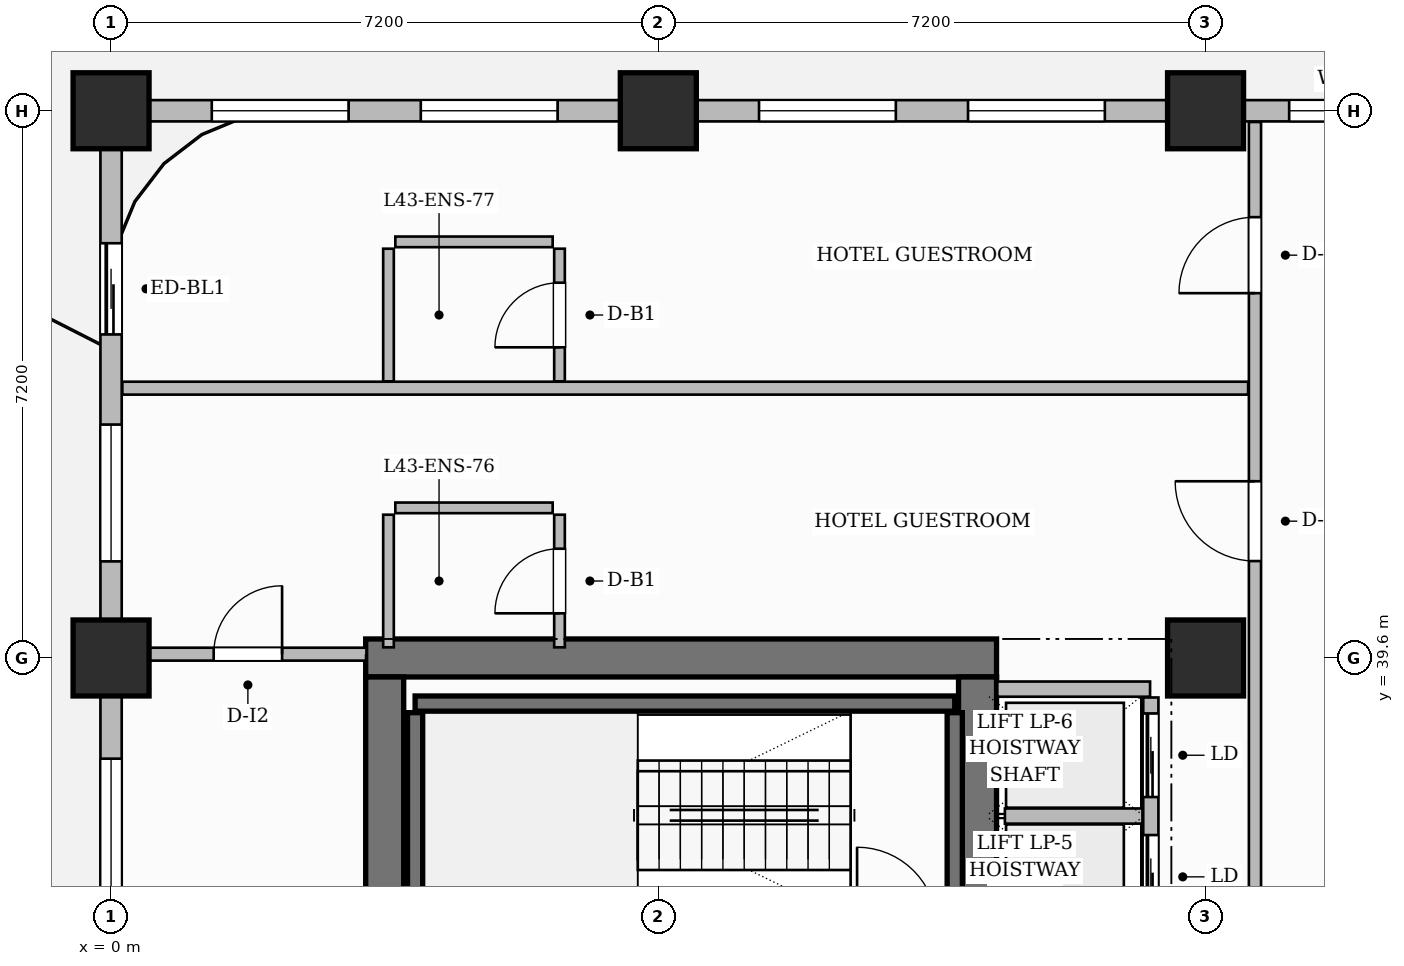
"""IFC4 building model, lengths in metres.
Left out: names, types, materials, properties, quantities, classifications, styles, units other than length and angle.
Written with IfcOpenShell. Run it as: python <this file> out.ifc"""

import sys

from ifc_helpers import new_model, si_unit, direction, frame, frame_2d, origin, origin_2d, place, context, subcontext, project, spatial, rectangle, extrude, source, transform, mapped, element, fill, save


model = new_model("IFC4")
c1 = context("Model", 3, precision=1e-05, world=origin(), true_north=direction((0.0, 1.0)))
c2 = subcontext(c1, "Body", "Model", "MODEL_VIEW")
j1 = project(units=[si_unit("LENGTHUNIT", "METRE"), si_unit("PLANEANGLEUNIT", "RADIAN")], contexts=[c1])
p1 = place(None, origin())
s1 = spatial("IfcSite", under=j1, at=p1, CompositionType="ELEMENT")
p2 = place(p1, origin())
s2 = spatial("IfcBuilding", under=s1, at=p2, CompositionType="ELEMENT")
p3 = place(p2, frame((0.0, 0.0, 173.4)))
s3 = spatial("IfcBuildingStorey", under=s2, at=p3, CompositionType="ELEMENT", Elevation=173.4)
p4 = place(p3, frame((3.35, 39.6, 0.0), z_axis=(0.0, 0.0, 1.0), x_axis=(1.0, 0.0, 0.0)))
e1 = element("IfcWall", 1, at=p4, inside=s3, PredefinedType="SHEAR", context=c2, shape_type="SweptSolid", body=[
    extrude(rectangle(XDim=8.3, YDim=0.5, at=frame_2d((4.15, 0.0))), origin(), (0.0, 0.0, 1.0), 3.85),
])
p5 = place(p3, frame((3.6, 25.45, 0.0), z_axis=(0.0, 0.0, 1.0), x_axis=(0.0, 1.0, 0.0)))
e2 = element("IfcWall", 2, at=p5, inside=s3, PredefinedType="SHEAR", context=c2, shape_type="SweptSolid", body=[
    extrude(rectangle(XDim=13.9, YDim=0.5, at=frame_2d((6.95, 0.0))), origin(), (0.0, 0.0, 1.0), 3.85),
])
p6 = place(p3, frame((11.4, 25.45, 0.0), z_axis=(0.0, 0.0, 1.0), x_axis=(0.0, 1.0, 0.0)))
e3 = element("IfcWall", 3, at=p6, inside=s3, PredefinedType="SHEAR", context=c2, shape_type="SweptSolid", body=[
    extrude(rectangle(XDim=13.9, YDim=0.5, at=frame_2d((6.95, 0.0))), origin(), (0.0, 0.0, 1.0), 3.85),
])
p7 = place(p6, frame((6.52, 0.0, 0.0)))
e4 = element("IfcOpeningElement", 4, at=p7, cuts=e3, PredefinedType="OPENING", context=c2, shape_type="SweptSolid", body=[
    extrude(rectangle(XDim=1.5, YDim=2.2, at=frame_2d((0.75, 1.1))), frame((0.0, 0.26, 0.0), z_axis=(0.0, -1.0, 0.0), x_axis=(1.0, 0.0, 0.0)), (0.0, 0.0, 1.0), 0.52),
])
m1 = source(origin(), c2, "Body", "SweptSolid", [
    extrude(rectangle(XDim=1.0, YDim=1.0, at=origin_2d()), origin(), (0.0, 0.0, 1.0), 3.85),
])
for number, where, z_axis, x_axis in (
    (5, (0.0, 39.6, 0.0), (0.0, 0.0, 1.0), (1.0, 0.0, 0.0)),
    (6, (0.0, 46.8, 0.0), (0.0, 0.0, 1.0), (1.0, 0.0, 0.0)),
    (7, (7.2, 46.8, 0.0), (0.0, 0.0, 1.0), (1.0, 0.0, 0.0)),
    (8, (14.4, 39.6, 0.0), (0.0, 0.0, 1.0), (1.0, 0.0, 0.0)),
    (9, (14.4, 46.8, 0.0), (0.0, 0.0, 1.0), (1.0, 0.0, 0.0)),
):
    element("IfcColumn", number, at=place(p3, frame(where, z_axis=z_axis, x_axis=x_axis)), inside=s3, PredefinedType="COLUMN", context=c2, shape_type="MappedRepresentation", body=[
        mapped(m1, transform((0.0, 0.0, 0.0), scale=1.0)),
    ])
p8 = place(p3, frame((4.0, 39.0, 0.0), z_axis=(0.0, 0.0, 1.0), x_axis=(1.0, 0.0, 0.0)))
e10 = element("IfcWall", 10, at=p8, inside=s3, PredefinedType="SHEAR", context=c2, shape_type="SweptSolid", body=[
    extrude(rectangle(XDim=7.1, YDim=0.2, at=frame_2d((3.55, 0.0))), origin(), (0.0, 0.0, 1.0), 3.85),
])
for number, where, z_axis, x_axis in (
    (11, (4.0, 36.18, 0.0), (0.0, 0.0, 1.0), (0.0, 1.0, 0.0)),
    (12, (11.1, 36.18, 0.0), (0.0, 0.0, 1.0), (0.0, 1.0, 0.0)),
):
    element("IfcWall", number, at=place(p3, frame(where, z_axis=z_axis, x_axis=x_axis)), inside=s3, PredefinedType="SHEAR", context=c2, shape_type="SweptSolid", body=[
        extrude(rectangle(XDim=2.7, YDim=0.2, at=frame_2d((1.35, 0.0))), origin(), (0.0, 0.0, 1.0), 3.85),
    ])
p9 = place(p3, frame((11.66, 39.19, 0.0), z_axis=(0.0, 0.0, 1.0), x_axis=(1.0, 0.0, 0.0)))
e13 = element("IfcWall", 13, at=p9, inside=s3, PredefinedType="PARTITIONING", context=c2, shape_type="SweptSolid", body=[
    extrude(rectangle(XDim=2.01, YDim=0.2, at=frame_2d((1.005, 0.0))), origin(), (0.0, 0.0, 1.0), 3.6),
])
p10 = place(p3, frame((13.68, 34.36, 0.0), z_axis=(0.0, 0.0, 1.0), x_axis=(0.0, 1.0, 0.0)))
e14 = element("IfcWall", 14, at=p10, inside=s3, PredefinedType="PARTITIONING", context=c2, shape_type="SweptSolid", body=[
    extrude(rectangle(XDim=4.72, YDim=0.2, at=frame_2d((2.36, 0.0))), origin(), (0.0, 0.0, 1.0), 3.6),
])
p11 = place(p10, frame((0.21, 0.0, 0.0)))
e15 = element("IfcOpeningElement", 15, at=p11, cuts=e14, PredefinedType="OPENING", context=c2, shape_type="SweptSolid", body=[
    extrude(rectangle(XDim=1.1, YDim=2.2, at=frame_2d((0.55, 1.1))), frame((0.0, 0.11, 0.0), z_axis=(0.0, -1.0, 0.0), x_axis=(1.0, 0.0, 0.0)), (0.0, 0.0, 1.0), 0.22),
])
p12 = place(p10, frame((1.81, 0.0, 0.0)))
e16 = element("IfcOpeningElement", 16, at=p12, cuts=e14, PredefinedType="OPENING", context=c2, shape_type="SweptSolid", body=[
    extrude(rectangle(XDim=1.1, YDim=2.2, at=frame_2d((0.55, 1.1))), frame((0.0, 0.11, 0.0), z_axis=(0.0, -1.0, 0.0), x_axis=(1.0, 0.0, 0.0)), (0.0, 0.0, 1.0), 0.22),
])
p13 = place(p10, frame((3.41, 0.0, 0.0)))
e17 = element("IfcOpeningElement", 17, at=p13, cuts=e14, PredefinedType="OPENING", context=c2, shape_type="SweptSolid", body=[
    extrude(rectangle(XDim=1.1, YDim=2.2, at=frame_2d((0.55, 1.1))), frame((0.0, 0.11, 0.0), z_axis=(0.0, -1.0, 0.0), x_axis=(1.0, 0.0, 0.0)), (0.0, 0.0, 1.0), 0.22),
])
p14 = place(p3, frame((11.76, 37.52, 0.0), z_axis=(0.0, 0.0, 1.0), x_axis=(1.0, 0.0, 0.0)))
e18 = element("IfcWall", 18, at=p14, inside=s3, PredefinedType="PARTITIONING", context=c2, shape_type="SweptSolid", body=[
    extrude(rectangle(XDim=1.81, YDim=0.2, at=frame_2d((0.905, 0.0))), origin(), (0.0, 0.0, 1.0), 3.6),
])
p15 = place(p3, frame((0.24, 39.65, 0.0), z_axis=(0.0, 0.0, 1.0), x_axis=(1.0, 0.0, 0.0)))
e19 = element("IfcWall", 19, at=p15, inside=s3, PredefinedType="PARTITIONING", context=c2, shape_type="SweptSolid", body=[
    extrude(rectangle(XDim=3.12, YDim=0.17, at=frame_2d((1.56, 0.0))), origin(), (0.0, 0.0, 1.0), 3.6),
])
p16 = place(p15, frame((1.11, 0.0, 0.0)))
e20 = element("IfcOpeningElement", 20, at=p16, cuts=e19, PredefinedType="OPENING", context=c2, shape_type="SweptSolid", body=[
    extrude(rectangle(XDim=0.9, YDim=2.15, at=frame_2d((0.45, 1.075))), frame((0.0, 0.095, 0.0), z_axis=(0.0, -1.0, 0.0), x_axis=(1.0, 0.0, 0.0)), (0.0, 0.0, 1.0), 0.19),
])
p17 = place(p3, frame((15.05, 34.34, 0.0), z_axis=(0.0, 0.0, 1.0), x_axis=(0.0, 1.0, 0.0)))
e21 = element("IfcWall", 21, at=p17, inside=s3, PredefinedType="PARTITIONING", context=c2, shape_type="SweptSolid", body=[
    extrude(rectangle(XDim=12.312, YDim=0.16, at=frame_2d((6.156, 0.0))), origin(), (0.0, 0.0, 1.0), 3.6),
])
p18 = place(p17, frame((6.535, 0.0, 0.0)))
e22 = element("IfcOpeningElement", 22, at=p18, cuts=e21, PredefinedType="OPENING", context=c2, shape_type="SweptSolid", body=[
    extrude(rectangle(XDim=1.05, YDim=2.25, at=frame_2d((0.525, 1.125))), frame((0.0, 0.09, 0.0), z_axis=(0.0, -1.0, 0.0), x_axis=(1.0, 0.0, 0.0)), (0.0, 0.0, 1.0), 0.18),
])
p19 = place(p17, frame((10.06, 0.0, 0.0)))
e23 = element("IfcOpeningElement", 23, at=p19, cuts=e21, PredefinedType="OPENING", context=c2, shape_type="SweptSolid", body=[
    extrude(rectangle(XDim=1.0, YDim=2.2, at=frame_2d((0.5, 1.1))), frame((0.0, 0.09, 0.0), z_axis=(0.0, -1.0, 0.0), x_axis=(1.0, 0.0, 0.0)), (0.0, 0.0, 1.0), 0.18),
])
p20 = place(p3, frame((0.148, 43.15, 0.0), z_axis=(0.0, 0.0, 1.0), x_axis=(1.0, 0.0, 0.0)))
e24 = element("IfcWall", 24, at=p20, inside=s3, PredefinedType="PARTITIONING", context=c2, shape_type="SweptSolid", body=[
    extrude(rectangle(XDim=14.812, YDim=0.17, at=frame_2d((7.406, 0.0))), origin(), (0.0, 0.0, 1.0), 3.6),
])
p21 = place(p3, frame((3.65, 39.74, 0.0), z_axis=(0.0, 0.0, 1.0), x_axis=(0.0, 1.0, 0.0)))
e25 = element("IfcWall", 25, at=p21, inside=s3, PredefinedType="PARTITIONING", context=c2, shape_type="SweptSolid", body=[
    extrude(rectangle(XDim=1.745, YDim=0.14, at=frame_2d((0.873, 0.0))), origin(), (0.0, 0.0, 1.0), 3.6),
])
p22 = place(p3, frame((3.74, 41.575, 0.0), z_axis=(0.0, 0.0, 1.0), x_axis=(1.0, 0.0, 0.0)))
e26 = element("IfcWall", 26, at=p22, inside=s3, PredefinedType="PARTITIONING", context=c2, shape_type="SweptSolid", body=[
    extrude(rectangle(XDim=2.07, YDim=0.14, at=frame_2d((1.035, 0.0))), origin(), (0.0, 0.0, 1.0), 3.085),
])
p23 = place(p3, frame((5.9, 39.74, 0.0), z_axis=(0.0, 0.0, 1.0), x_axis=(0.0, 1.0, 0.0)))
e27 = element("IfcWall", 27, at=p23, inside=s3, PredefinedType="PARTITIONING", context=c2, shape_type="SweptSolid", body=[
    extrude(rectangle(XDim=1.745, YDim=0.14, at=frame_2d((0.873, 0.0))), origin(), (0.0, 0.0, 1.0), 3.6),
])
p24 = place(p23, frame((0.448, 0.0, 0.0)))
e28 = element("IfcOpeningElement", 28, at=p24, cuts=e27, PredefinedType="OPENING", context=c2, shape_type="SweptSolid", body=[
    extrude(rectangle(XDim=0.85, YDim=2.1, at=frame_2d((0.425, 1.05))), frame((0.0, 0.08, 0.0), z_axis=(0.0, -1.0, 0.0), x_axis=(1.0, 0.0, 0.0)), (0.0, 0.0, 1.0), 0.16),
])
p25 = place(p3, frame((3.65, 43.24, 0.0), z_axis=(0.0, 0.0, 1.0), x_axis=(0.0, 1.0, 0.0)))
e29 = element("IfcWall", 29, at=p25, inside=s3, PredefinedType="PARTITIONING", context=c2, shape_type="SweptSolid", body=[
    extrude(rectangle(XDim=1.745, YDim=0.14, at=frame_2d((0.873, 0.0))), origin(), (0.0, 0.0, 1.0), 3.6),
])
p26 = place(p3, frame((3.74, 45.075, 0.0), z_axis=(0.0, 0.0, 1.0), x_axis=(1.0, 0.0, 0.0)))
e30 = element("IfcWall", 30, at=p26, inside=s3, PredefinedType="PARTITIONING", context=c2, shape_type="SweptSolid", body=[
    extrude(rectangle(XDim=2.07, YDim=0.14, at=frame_2d((1.035, 0.0))), origin(), (0.0, 0.0, 1.0), 3.6),
])
p27 = place(p3, frame((5.9, 43.24, 0.0), z_axis=(0.0, 0.0, 1.0), x_axis=(0.0, 1.0, 0.0)))
e31 = element("IfcWall", 31, at=p27, inside=s3, PredefinedType="PARTITIONING", context=c2, shape_type="SweptSolid", body=[
    extrude(rectangle(XDim=1.745, YDim=0.14, at=frame_2d((0.873, 0.0))), origin(), (0.0, 0.0, 1.0), 3.6),
])
p28 = place(p27, frame((0.448, 0.0, 0.0)))
e32 = element("IfcOpeningElement", 32, at=p28, cuts=e31, PredefinedType="OPENING", context=c2, shape_type="SweptSolid", body=[
    extrude(rectangle(XDim=0.85, YDim=2.1, at=frame_2d((0.425, 1.05))), frame((0.0, 0.08, 0.0), z_axis=(0.0, -1.0, 0.0), x_axis=(1.0, 0.0, 0.0)), (0.0, 0.0, 1.0), 0.16),
])
p29 = place(p3, frame((0.0, 25.25, 0.0), z_axis=(0.0, 0.0, 1.0), x_axis=(0.0, 1.0, 0.0)))
e33 = element("IfcWall", 33, at=p29, inside=s3, PredefinedType="SOLIDWALL", context=c2, shape_type="SweptSolid", body=[
    extrude(rectangle(XDim=21.5, YDim=0.28, at=frame_2d((10.75, 0.0))), origin(), (0.0, 0.0, 1.0), 3.085),
])
p30 = place(p29, frame((18.607, 0.0, 0.0)))
e34 = element("IfcOpeningElement", 34, at=p30, cuts=e33, PredefinedType="OPENING", context=c2, shape_type="SweptSolid", body=[
    extrude(rectangle(XDim=1.2, YDim=2.2, at=frame_2d((0.6, 1.1))), frame((0.0, 0.15, 0.0), z_axis=(0.0, -1.0, 0.0), x_axis=(1.0, 0.0, 0.0)), (0.0, 0.0, 1.0), 0.3),
])
p31 = place(p29, frame((0.8, 0.0, 0.0)))
e35 = element("IfcOpeningElement", 35, at=p31, cuts=e33, PredefinedType="OPENING", context=c2, shape_type="SweptSolid", body=[
    extrude(rectangle(XDim=1.2, YDim=2.2, at=frame_2d((0.6, 1.1))), frame((0.0, 0.15, 0.0), z_axis=(0.0, -1.0, 0.0), x_axis=(1.0, 0.0, 0.0)), (0.0, 0.0, 1.0), 0.3),
])
p32 = place(p29, frame((3.425, 0.0, 0.8)))
e36 = element("IfcOpeningElement", 36, at=p32, cuts=e33, PredefinedType="OPENING", context=c2, shape_type="SweptSolid", body=[
    extrude(rectangle(XDim=1.8, YDim=1.85, at=frame_2d((0.9, 0.925))), frame((0.0, 0.15, 0.0), z_axis=(0.0, -1.0, 0.0), x_axis=(1.0, 0.0, 0.0)), (0.0, 0.0, 1.0), 0.3),
])
p33 = place(p29, frame((8.475, 0.0, 0.8)))
e37 = element("IfcOpeningElement", 37, at=p33, cuts=e33, PredefinedType="OPENING", context=c2, shape_type="SweptSolid", body=[
    extrude(rectangle(XDim=1.8, YDim=1.85, at=frame_2d((0.9, 0.925))), frame((0.0, 0.15, 0.0), z_axis=(0.0, -1.0, 0.0), x_axis=(1.0, 0.0, 0.0)), (0.0, 0.0, 1.0), 0.3),
])
p34 = place(p29, frame((11.225, 0.0, 0.8)))
e38 = element("IfcOpeningElement", 38, at=p34, cuts=e33, PredefinedType="OPENING", context=c2, shape_type="SweptSolid", body=[
    extrude(rectangle(XDim=1.8, YDim=1.85, at=frame_2d((0.9, 0.925))), frame((0.0, 0.15, 0.0), z_axis=(0.0, -1.0, 0.0), x_axis=(1.0, 0.0, 0.0)), (0.0, 0.0, 1.0), 0.3),
])
p35 = place(p29, frame((15.621, 0.0, 0.8)))
e39 = element("IfcOpeningElement", 39, at=p35, cuts=e33, PredefinedType="OPENING", context=c2, shape_type="SweptSolid", body=[
    extrude(rectangle(XDim=1.8, YDim=1.85, at=frame_2d((0.9, 0.925))), frame((0.0, 0.15, 0.0), z_axis=(0.0, -1.0, 0.0), x_axis=(1.0, 0.0, 0.0)), (0.0, 0.0, 1.0), 0.3),
])
p36 = place(p3, frame((0.0, 46.8, 0.0), z_axis=(0.0, 0.0, 1.0), x_axis=(1.0, 0.0, 0.0)))
e40 = element("IfcWall", 40, at=p36, inside=s3, PredefinedType="SOLIDWALL", context=c2, shape_type="SweptSolid", body=[
    extrude(rectangle(XDim=18.0, YDim=0.28, at=frame_2d((9.0, 0.0))), origin(), (0.0, 0.0, 1.0), 3.085),
])
p37 = place(p36, frame((1.325, 0.0, 0.8)))
e41 = element("IfcOpeningElement", 41, at=p37, cuts=e40, PredefinedType="OPENING", context=c2, shape_type="SweptSolid", body=[
    extrude(rectangle(XDim=1.8, YDim=1.85, at=frame_2d((0.9, 0.925))), frame((0.0, 0.15, 0.0), z_axis=(0.0, -1.0, 0.0), x_axis=(1.0, 0.0, 0.0)), (0.0, 0.0, 1.0), 0.3),
])
p38 = place(p36, frame((4.075, 0.0, 0.8)))
e42 = element("IfcOpeningElement", 42, at=p38, cuts=e40, PredefinedType="OPENING", context=c2, shape_type="SweptSolid", body=[
    extrude(rectangle(XDim=1.8, YDim=1.85, at=frame_2d((0.9, 0.925))), frame((0.0, 0.15, 0.0), z_axis=(0.0, -1.0, 0.0), x_axis=(1.0, 0.0, 0.0)), (0.0, 0.0, 1.0), 0.3),
])
p39 = place(p36, frame((8.525, 0.0, 0.8)))
e43 = element("IfcOpeningElement", 43, at=p39, cuts=e40, PredefinedType="OPENING", context=c2, shape_type="SweptSolid", body=[
    extrude(rectangle(XDim=1.8, YDim=1.85, at=frame_2d((0.9, 0.925))), frame((0.0, 0.15, 0.0), z_axis=(0.0, -1.0, 0.0), x_axis=(1.0, 0.0, 0.0)), (0.0, 0.0, 1.0), 0.3),
])
p40 = place(p36, frame((11.275, 0.0, 0.8)))
e44 = element("IfcOpeningElement", 44, at=p40, cuts=e40, PredefinedType="OPENING", context=c2, shape_type="SweptSolid", body=[
    extrude(rectangle(XDim=1.8, YDim=1.85, at=frame_2d((0.9, 0.925))), frame((0.0, 0.15, 0.0), z_axis=(0.0, -1.0, 0.0), x_axis=(1.0, 0.0, 0.0)), (0.0, 0.0, 1.0), 0.3),
])
p41 = place(p36, frame((15.5, 0.0, 0.8)))
e45 = element("IfcOpeningElement", 45, at=p41, cuts=e40, PredefinedType="OPENING", context=c2, shape_type="SweptSolid", body=[
    extrude(rectangle(XDim=1.4, YDim=1.85, at=frame_2d((0.7, 0.925))), frame((0.0, 0.15, 0.0), z_axis=(0.0, -1.0, 0.0), x_axis=(1.0, 0.0, 0.0)), (0.0, 0.0, 1.0), 0.3),
])
m2 = source(origin(), c2, "Body", "SweptSolid", [
    extrude(rectangle(XDim=0.9, YDim=2.15, at=frame_2d((0.45, 1.075))), frame((0.0, 0.025, 0.0), z_axis=(0.0, -1.0, 0.0), x_axis=(1.0, 0.0, 0.0)), (0.0, 0.0, 1.0), 0.05),
])
p42 = place(p16, origin())
e46 = element("IfcDoor", 46, at=p42, inside=s3, OperationType="SINGLE_SWING_RIGHT", PredefinedType="DOOR", context=c2, shape_type="MappedRepresentation", body=[
    mapped(m2, transform((0.0, 0.0, 0.0), scale=1.0)),
])
fill(e20, e46)
m3 = source(origin(), c2, "Body", "SweptSolid", [
    extrude(rectangle(XDim=0.85, YDim=2.1, at=frame_2d((0.425, 1.05))), frame((0.0, 0.025, 0.0), z_axis=(0.0, -1.0, 0.0), x_axis=(1.0, 0.0, 0.0)), (0.0, 0.0, 1.0), 0.05),
])
p43 = place(p24, origin())
e47 = element("IfcDoor", 47, at=p43, inside=s3, OperationType="SINGLE_SWING_LEFT", PredefinedType="DOOR", context=c2, shape_type="MappedRepresentation", body=[
    mapped(m3, transform((0.0, 0.0, 0.0), scale=1.0)),
])
fill(e28, e47)
m4 = source(origin(), c2, "Body", "SweptSolid", [
    extrude(rectangle(XDim=1.05, YDim=2.25, at=frame_2d((0.525, 1.125))), frame((0.0, 0.025, 0.0), z_axis=(0.0, -1.0, 0.0), x_axis=(1.0, 0.0, 0.0)), (0.0, 0.0, 1.0), 0.05),
])
p44 = place(p18, origin())
e48 = element("IfcDoor", 48, at=p44, inside=s3, OperationType="SINGLE_SWING_RIGHT", PredefinedType="DOOR", context=c2, shape_type="MappedRepresentation", body=[
    mapped(m4, transform((0.0, 0.0, 0.0), scale=1.0)),
])
fill(e22, e48)
p45 = place(p28, origin())
e49 = element("IfcDoor", 49, at=p45, inside=s3, OperationType="SINGLE_SWING_LEFT", PredefinedType="DOOR", context=c2, shape_type="MappedRepresentation", body=[
    mapped(m3, transform((0.0, 0.0, 0.0), scale=1.0)),
])
fill(e32, e49)
m5 = source(origin(), c2, "Body", "SweptSolid", [
    extrude(rectangle(XDim=1.0, YDim=2.2, at=frame_2d((0.5, 1.1))), frame((0.0, 0.025, 0.0), z_axis=(0.0, -1.0, 0.0), x_axis=(1.0, 0.0, 0.0)), (0.0, 0.0, 1.0), 0.05),
])
p46 = place(p19, origin())
e50 = element("IfcDoor", 50, at=p46, inside=s3, OperationType="SINGLE_SWING_LEFT", PredefinedType="DOOR", context=c2, shape_type="MappedRepresentation", body=[
    mapped(m5, transform((0.0, 0.0, 0.0), scale=1.0)),
])
fill(e23, e50)
m6 = source(origin(), c2, "Body", "SweptSolid", [
    extrude(rectangle(XDim=1.1, YDim=2.2, at=frame_2d((0.55, 1.1))), frame((0.0, 0.025, 0.0), z_axis=(0.0, -1.0, 0.0), x_axis=(1.0, 0.0, 0.0)), (0.0, 0.0, 1.0), 0.05),
])
p47 = place(p12, origin())
e51 = element("IfcDoor", 51, at=p47, inside=s3, OperationType="SLIDING_TO_LEFT", PredefinedType="DOOR", context=c2, shape_type="MappedRepresentation", body=[
    mapped(m6, transform((0.0, 0.0, 0.0), scale=1.0)),
])
fill(e16, e51)
p48 = place(p13, origin())
e52 = element("IfcDoor", 52, at=p48, inside=s3, OperationType="SLIDING_TO_LEFT", PredefinedType="DOOR", context=c2, shape_type="MappedRepresentation", body=[
    mapped(m6, transform((0.0, 0.0, 0.0), scale=1.0)),
])
fill(e17, e52)
m7 = source(origin(), c2, "Body", "SweptSolid", [
    extrude(rectangle(XDim=1.2, YDim=2.2, at=frame_2d((0.6, 1.1))), frame((0.0, 0.025, 0.0), z_axis=(0.0, -1.0, 0.0), x_axis=(1.0, 0.0, 0.0)), (0.0, 0.0, 1.0), 0.05),
])
p49 = place(p30, origin())
e53 = element("IfcDoor", 53, at=p49, inside=s3, OperationType="SLIDING_TO_LEFT", PredefinedType="DOOR", context=c2, shape_type="MappedRepresentation", body=[
    mapped(m7, transform((0.0, 0.0, 0.0), scale=1.0)),
])
fill(e34, e53)
m8 = source(origin(), c2, "Body", "SweptSolid", [
    extrude(rectangle(XDim=1.8, YDim=1.85, at=frame_2d((0.9, 0.925))), frame((0.0, 0.03, 0.0), z_axis=(0.0, -1.0, 0.0), x_axis=(1.0, 0.0, 0.0)), (0.0, 0.0, 1.0), 0.06),
])
p50 = place(p34, origin())
e54 = element("IfcWindow", 54, at=p50, inside=s3, PartitioningType="DOUBLE_PANEL_VERTICAL", PredefinedType="WINDOW", context=c2, shape_type="MappedRepresentation", body=[
    mapped(m8, transform((0.0, 0.0, 0.0), scale=1.0)),
])
fill(e38, e54)
p51 = place(p35, origin())
e55 = element("IfcWindow", 55, at=p51, inside=s3, PartitioningType="DOUBLE_PANEL_VERTICAL", PredefinedType="WINDOW", context=c2, shape_type="MappedRepresentation", body=[
    mapped(m8, transform((0.0, 0.0, 0.0), scale=1.0)),
])
fill(e39, e55)
p52 = place(p37, origin())
e56 = element("IfcWindow", 56, at=p52, inside=s3, PartitioningType="DOUBLE_PANEL_VERTICAL", PredefinedType="WINDOW", context=c2, shape_type="MappedRepresentation", body=[
    mapped(m8, transform((0.0, 0.0, 0.0), scale=1.0)),
])
fill(e41, e56)
p53 = place(p38, origin())
e57 = element("IfcWindow", 57, at=p53, inside=s3, PartitioningType="DOUBLE_PANEL_VERTICAL", PredefinedType="WINDOW", context=c2, shape_type="MappedRepresentation", body=[
    mapped(m8, transform((0.0, 0.0, 0.0), scale=1.0)),
])
fill(e42, e57)
p54 = place(p39, origin())
e58 = element("IfcWindow", 58, at=p54, inside=s3, PartitioningType="DOUBLE_PANEL_VERTICAL", PredefinedType="WINDOW", context=c2, shape_type="MappedRepresentation", body=[
    mapped(m8, transform((0.0, 0.0, 0.0), scale=1.0)),
])
fill(e43, e58)
p55 = place(p40, origin())
e59 = element("IfcWindow", 59, at=p55, inside=s3, PartitioningType="DOUBLE_PANEL_VERTICAL", PredefinedType="WINDOW", context=c2, shape_type="MappedRepresentation", body=[
    mapped(m8, transform((0.0, 0.0, 0.0), scale=1.0)),
])
fill(e44, e59)
m9 = source(origin(), c2, "Body", "SweptSolid", [
    extrude(rectangle(XDim=1.4, YDim=1.85, at=frame_2d((0.7, 0.925))), frame((0.0, 0.03, 0.0), z_axis=(0.0, -1.0, 0.0), x_axis=(1.0, 0.0, 0.0)), (0.0, 0.0, 1.0), 0.06),
])
p56 = place(p41, origin())
e60 = element("IfcWindow", 60, at=p56, inside=s3, PartitioningType="SINGLE_PANEL", PredefinedType="WINDOW", context=c2, shape_type="MappedRepresentation", body=[
    mapped(m9, transform((0.0, 0.0, 0.0), scale=1.0)),
])
fill(e45, e60)
save(model, sys.argv[1])
